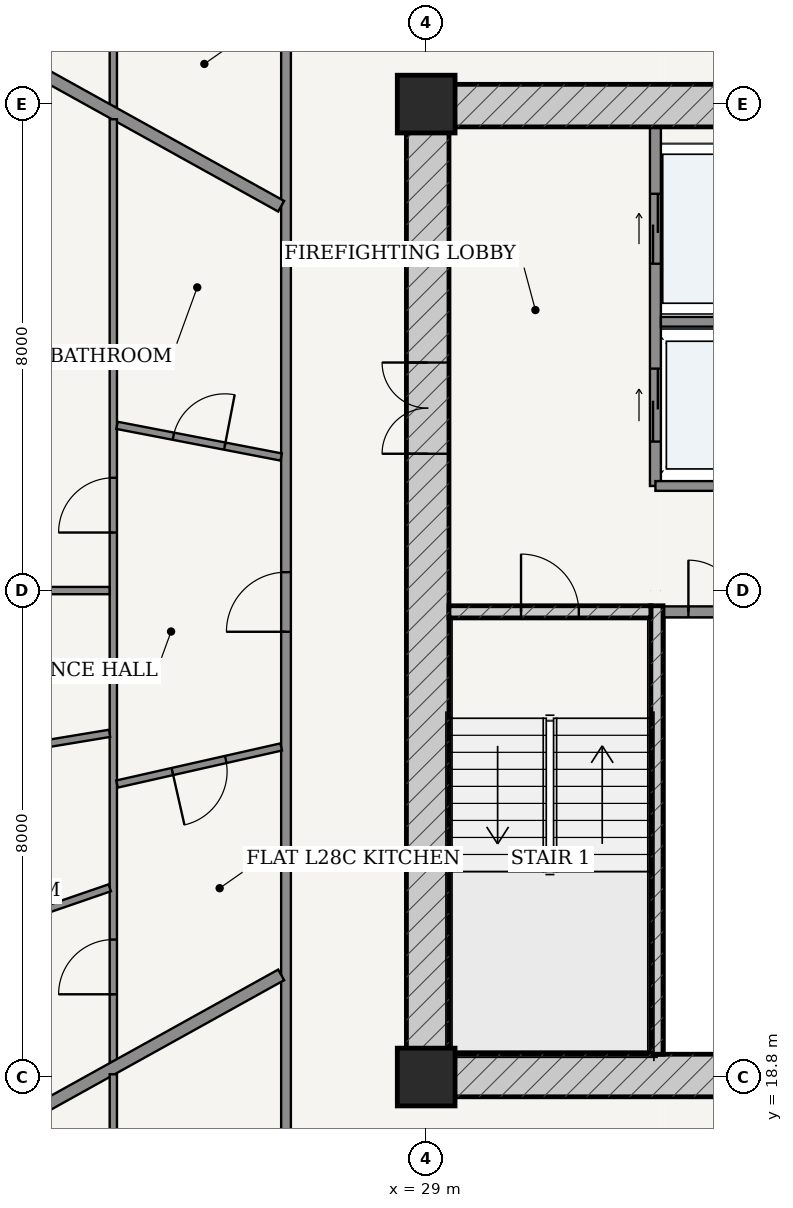
"""IFC4 building model, lengths in metres.
Left out: names, types, materials, properties, quantities, classifications, styles, units other than length and angle.
Written with IfcOpenShell. Run it as: python <this file> out.ifc"""

import sys

from ifc_helpers import new_model, si_unit, direction, frame, frame_2d, origin, origin_2d, place, context, subcontext, project, spatial, rectangle, extrude, source, transform, mapped, element, fill, save


model = new_model("IFC4")
c1 = context("Model", 3, precision=1e-05, world=origin(), true_north=direction((-0.2419218956, 0.970295726276)))
c2 = subcontext(c1, "Body", "Model", "MODEL_VIEW")
j1 = project(units=[si_unit("LENGTHUNIT", "METRE"), si_unit("PLANEANGLEUNIT", "RADIAN")], contexts=[c1])
p1 = place(None, origin())
s1 = spatial("IfcSite", under=j1, at=p1, CompositionType="ELEMENT")
p2 = place(p1, origin())
s2 = spatial("IfcBuilding", under=s1, at=p2, CompositionType="ELEMENT")
p3 = place(p2, frame((0.0, 0.0, 108.6)))
s3 = spatial("IfcBuildingStorey", under=s2, at=p3, CompositionType="ELEMENT", Elevation=108.6)
for number, where, z_axis, x_axis in (
    (1, (29.0, 18.8, 0.0), (0.0, 0.0, 1.0), (1.0, 0.0, 0.0)),
    (2, (29.0, 34.8, 0.0), (0.0, 0.0, 1.0), (1.0, 0.0, 0.0)),
):
    element("IfcColumn", number, at=place(p3, frame(where, z_axis=z_axis, x_axis=x_axis)), inside=s3, PredefinedType="COLUMN", context=c2, shape_type="SweptSolid", body=[
        extrude(rectangle(XDim=0.95, YDim=0.95, at=origin_2d()), origin(), (0.0, 0.0, 1.0), 3.6),
    ])
p4 = place(p3, frame((28.675, 18.825, 0.0), z_axis=(0.0, 0.0, 1.0), x_axis=(1.0, 0.0, 0.0)))
e3 = element("IfcWall", 3, at=p4, inside=s3, PredefinedType="SHEAR", context=c2, shape_type="SweptSolid", body=[
    extrude(rectangle(XDim=18.65, YDim=0.7, at=frame_2d((9.325, 0.0))), origin(), (0.0, 0.0, 1.0), 3.325),
])
p5 = place(p4, frame((6.877, 0.0, 0.0)))
e4 = element("IfcOpeningElement", 4, at=p5, cuts=e3, PredefinedType="OPENING", context=c2, shape_type="SweptSolid", body=[
    extrude(rectangle(XDim=0.85, YDim=2.1, at=frame_2d((0.425, 1.05))), frame((0.0, 0.36, 0.0), z_axis=(0.0, -1.0, 0.0), x_axis=(1.0, 0.0, 0.0)), (0.0, 0.0, 1.0), 0.72),
])
p6 = place(p4, frame((8.9, 0.0, 0.0)))
e5 = element("IfcOpeningElement", 5, at=p6, cuts=e3, PredefinedType="OPENING", context=c2, shape_type="SweptSolid", body=[
    extrude(rectangle(XDim=0.85, YDim=2.1, at=frame_2d((0.425, 1.05))), frame((0.0, 0.36, 0.0), z_axis=(0.0, -1.0, 0.0), x_axis=(1.0, 0.0, 0.0)), (0.0, 0.0, 1.0), 0.72),
])
p7 = place(p4, frame((10.923, 0.0, 0.0)))
e6 = element("IfcOpeningElement", 6, at=p7, cuts=e3, PredefinedType="OPENING", context=c2, shape_type="SweptSolid", body=[
    extrude(rectangle(XDim=0.85, YDim=2.1, at=frame_2d((0.425, 1.05))), frame((0.0, 0.36, 0.0), z_axis=(0.0, -1.0, 0.0), x_axis=(1.0, 0.0, 0.0)), (0.0, 0.0, 1.0), 0.72),
])
p8 = place(p3, frame((28.675, 34.775, 0.0), z_axis=(0.0, 0.0, 1.0), x_axis=(1.0, 0.0, 0.0)))
e7 = element("IfcWall", 7, at=p8, inside=s3, PredefinedType="SHEAR", context=c2, shape_type="SweptSolid", body=[
    extrude(rectangle(XDim=18.65, YDim=0.7, at=frame_2d((9.325, 0.0))), origin(), (0.0, 0.0, 1.0), 3.325),
])
p9 = place(p8, frame((7.357, 0.0, 0.0)))
e8 = element("IfcOpeningElement", 8, at=p9, cuts=e7, PredefinedType="OPENING", context=c2, shape_type="SweptSolid", body=[
    extrude(rectangle(XDim=0.86, YDim=2.1, at=frame_2d((0.43, 1.05))), frame((0.0, 0.36, 0.0), z_axis=(0.0, -1.0, 0.0), x_axis=(1.0, 0.0, 0.0)), (0.0, 0.0, 1.0), 0.72),
])
p10 = place(p8, frame((10.438, 0.0, 0.0)))
e9 = element("IfcOpeningElement", 9, at=p10, cuts=e7, PredefinedType="OPENING", context=c2, shape_type="SweptSolid", body=[
    extrude(rectangle(XDim=0.85, YDim=2.1, at=frame_2d((0.425, 1.05))), frame((0.0, 0.36, 0.0), z_axis=(0.0, -1.0, 0.0), x_axis=(1.0, 0.0, 0.0)), (0.0, 0.0, 1.0), 0.72),
])
p11 = place(p3, frame((29.025, 19.175, 0.0), z_axis=(0.0, 0.0, 1.0), x_axis=(0.0, 1.0, 0.0)))
e10 = element("IfcWall", 10, at=p11, inside=s3, PredefinedType="SHEAR", context=c2, shape_type="SweptSolid", body=[
    extrude(rectangle(XDim=15.25, YDim=0.7, at=frame_2d((7.625, 0.0))), origin(), (0.0, 0.0, 1.0), 3.325),
])
p12 = place(p11, frame((9.875, 0.0, 0.0)))
e11 = element("IfcOpeningElement", 11, at=p12, cuts=e10, PredefinedType="OPENING", context=c2, shape_type="SweptSolid", body=[
    extrude(rectangle(XDim=1.5, YDim=2.2, at=frame_2d((0.75, 1.1))), frame((0.0, 0.36, 0.0), z_axis=(0.0, -1.0, 0.0), x_axis=(1.0, 0.0, 0.0)), (0.0, 0.0, 1.0), 0.72),
])
p13 = place(p3, frame((32.795, 19.175, 0.0), z_axis=(0.0, 0.0, 1.0), x_axis=(0.0, 1.0, 0.0)))
e12 = element("IfcWall", 12, at=p13, inside=s3, PredefinedType="SOLIDWALL", context=c2, shape_type="SweptSolid", body=[
    extrude(rectangle(XDim=7.375, YDim=0.2, at=frame_2d((3.688, 0.0))), origin(), (0.0, 0.0, 1.0), 3.325),
])
p14 = place(p3, frame((29.375, 26.45, 0.0), z_axis=(0.0, 0.0, 1.0), x_axis=(1.0, 0.0, 0.0)))
e13 = element("IfcWall", 13, at=p14, inside=s3, PredefinedType="SOLIDWALL", context=c2, shape_type="SweptSolid", body=[
    extrude(rectangle(XDim=3.32, YDim=0.2, at=frame_2d((1.66, 0.0))), origin(), (0.0, 0.0, 1.0), 3.325),
])
p15 = place(p14, frame((1.185, 0.0, 0.0)))
e14 = element("IfcOpeningElement", 14, at=p15, cuts=e13, PredefinedType="OPENING", context=c2, shape_type="SweptSolid", body=[
    extrude(rectangle(XDim=0.95, YDim=2.15, at=frame_2d((0.475, 1.075))), frame((0.0, 0.11, 0.0), z_axis=(0.0, -1.0, 0.0), x_axis=(1.0, 0.0, 0.0)), (0.0, 0.0, 1.0), 0.22),
])
p16 = place(p3, frame((32.9, 26.45, 0.0), z_axis=(0.0, 0.0, 1.0), x_axis=(1.0, 0.0, 0.0)))
e15 = element("IfcWall", 15, at=p16, inside=s3, PredefinedType="PARTITIONING", context=c2, shape_type="SweptSolid", body=[
    extrude(rectangle(XDim=1.675, YDim=0.18, at=frame_2d((0.837, 0.0))), origin(), (0.0, 0.0, 1.0), 3.325),
])
p17 = place(p16, frame((0.413, 0.0, 0.0)))
e16 = element("IfcOpeningElement", 16, at=p17, cuts=e15, PredefinedType="OPENING", context=c2, shape_type="SweptSolid", body=[
    extrude(rectangle(XDim=0.85, YDim=2.1, at=frame_2d((0.425, 1.05))), frame((0.0, 0.1, 0.0), z_axis=(0.0, -1.0, 0.0), x_axis=(1.0, 0.0, 0.0)), (0.0, 0.0, 1.0), 0.2),
])
p18 = place(p3, frame((32.77, 28.52, 0.0), z_axis=(0.0, 0.0, 1.0), x_axis=(0.0, 1.0, 0.0)))
e17 = element("IfcWall", 17, at=p18, inside=s3, PredefinedType="PARTITIONING", context=c2, shape_type="SweptSolid", body=[
    extrude(rectangle(XDim=5.905, YDim=0.18, at=frame_2d((2.953, 0.0))), origin(), (0.0, 0.0, 1.0), 3.325),
])
p19 = place(p18, frame((3.655, 0.0, 0.0)))
e18 = element("IfcOpeningElement", 18, at=p19, cuts=e17, PredefinedType="OPENING", context=c2, shape_type="SweptSolid", body=[
    extrude(rectangle(XDim=1.15, YDim=2.2, at=frame_2d((0.575, 1.1))), frame((0.0, 0.1, 0.0), z_axis=(0.0, -1.0, 0.0), x_axis=(1.0, 0.0, 0.0)), (0.0, 0.0, 1.0), 0.2),
])
p20 = place(p18, frame((0.73, 0.0, 0.0)))
e19 = element("IfcOpeningElement", 19, at=p20, cuts=e17, PredefinedType="OPENING", context=c2, shape_type="SweptSolid", body=[
    extrude(rectangle(XDim=1.2, YDim=2.25, at=frame_2d((0.6, 1.125))), frame((0.0, 0.1, 0.0), z_axis=(0.0, -1.0, 0.0), x_axis=(1.0, 0.0, 0.0)), (0.0, 0.0, 1.0), 0.2),
])
p21 = place(p3, frame((32.86, 31.22, 0.0), z_axis=(0.0, 0.0, 1.0), x_axis=(1.0, 0.0, 0.0)))
e20 = element("IfcWall", 20, at=p21, inside=s3, PredefinedType="PARTITIONING", context=c2, shape_type="SweptSolid", body=[
    extrude(rectangle(XDim=1.715, YDim=0.16, at=frame_2d((0.857, 0.0))), origin(), (0.0, 0.0, 1.0), 3.325),
])
p22 = place(p3, frame((32.77, 28.52, 0.0), z_axis=(0.0, 0.0, 1.0), x_axis=(1.0, 0.0, 0.0)))
e21 = element("IfcWall", 21, at=p22, inside=s3, PredefinedType="PARTITIONING", context=c2, shape_type="SweptSolid", body=[
    extrude(rectangle(XDim=1.805, YDim=0.16, at=frame_2d((0.902, 0.0))), origin(), (0.0, 0.0, 1.0), 3.325),
])
p23 = place(p3, frame((26.695, 16.575, 0.0), z_axis=(0.0, 0.0, 1.0), x_axis=(0.0, 1.0, 0.0)))
e22 = element("IfcWall", 22, at=p23, inside=s3, PredefinedType="PARTITIONING", context=c2, shape_type="SweptSolid", body=[
    extrude(rectangle(XDim=20.45, YDim=0.16, at=frame_2d((10.225, 0.0))), origin(), (0.0, 0.0, 1.0), 2.767),
])
p24 = place(p23, frame((9.547, 0.0, 0.0)))
e23 = element("IfcOpeningElement", 23, at=p24, cuts=e22, PredefinedType="OPENING", context=c2, shape_type="SweptSolid", body=[
    extrude(rectangle(XDim=0.98, YDim=2.2, at=frame_2d((0.49, 1.1))), frame((0.0, 0.09, 0.0), z_axis=(0.0, -1.0, 0.0), x_axis=(1.0, 0.0, 0.0)), (0.0, 0.0, 1.0), 0.18),
])
p25 = place(p3, frame((23.855, 34.754, 0.0), z_axis=(0.0, 0.0, 1.0), x_axis=(0.0, 1.0, 0.0)))
e24 = element("IfcWall", 24, at=p25, inside=s3, PredefinedType="PARTITIONING", context=c2, shape_type="SweptSolid", body=[
    extrude(rectangle(XDim=5.191, YDim=0.12, at=frame_2d((2.595, 0.0))), origin(), (0.0, 0.0, 1.0), 3.004),
])
p26 = place(p25, frame((2.145, 0.0, 0.0)))
e25 = element("IfcOpeningElement", 25, at=p26, cuts=e24, PredefinedType="OPENING", context=c2, shape_type="SweptSolid", body=[
    extrude(rectangle(XDim=0.9, YDim=2.15, at=frame_2d((0.45, 1.075))), frame((0.0, 0.07, 0.0), z_axis=(0.0, -1.0, 0.0), x_axis=(1.0, 0.0, 0.0)), (0.0, 0.0, 1.0), 0.14),
])
p27 = place(p3, frame((26.615, 33.12, 0.0), z_axis=(0.0, 0.0, 1.0), x_axis=(-0.874319192772, 0.485351366692, 0.0)))
e26 = element("IfcWall", 26, at=p27, inside=s3, PredefinedType="PARTITIONING", context=c2, shape_type="SweptSolid", body=[
    extrude(rectangle(XDim=12.158, YDim=0.2, at=frame_2d((6.079, 0.0))), origin(), (0.0, 0.0, 1.0), 2.767),
])
p28 = place(p3, frame((23.855, 19.05, 0.0), z_axis=(0.0, 0.0, 1.0), x_axis=(0.0, 1.0, 0.0)))
e27 = element("IfcWall", 27, at=p28, inside=s3, PredefinedType="PARTITIONING", context=c2, shape_type="SweptSolid", body=[
    extrude(rectangle(XDim=15.501, YDim=0.12, at=frame_2d((7.75, 0.0))), origin(), (0.0, 0.0, 1.0), 2.767),
])
p29 = place(p28, frame((8.705, 0.0, 0.0)))
e28 = element("IfcOpeningElement", 28, at=p29, cuts=e27, PredefinedType="OPENING", context=c2, shape_type="SweptSolid", body=[
    extrude(rectangle(XDim=0.9, YDim=2.15, at=frame_2d((0.45, 1.075))), frame((0.0, 0.07, 0.0), z_axis=(0.0, -1.0, 0.0), x_axis=(1.0, 0.0, 0.0)), (0.0, 0.0, 1.0), 0.14),
])
p30 = place(p28, frame((1.111, 0.0, 0.0)))
e29 = element("IfcOpeningElement", 29, at=p30, cuts=e27, PredefinedType="OPENING", context=c2, shape_type="SweptSolid", body=[
    extrude(rectangle(XDim=0.9, YDim=2.15, at=frame_2d((0.45, 1.075))), frame((0.0, 0.07, 0.0), z_axis=(0.0, -1.0, 0.0), x_axis=(1.0, 0.0, 0.0)), (0.0, 0.0, 1.0), 0.14),
])
p31 = place(p3, frame((23.793, 26.8, 0.0), z_axis=(0.0, 0.0, 1.0), x_axis=(-1.0, 0.0, 0.0)))
e30 = element("IfcWall", 30, at=p31, inside=s3, PredefinedType="PARTITIONING", context=c2, shape_type="SweptSolid", body=[
    extrude(rectangle(XDim=12.333, YDim=0.12, at=frame_2d((6.167, 0.0))), origin(), (0.0, 0.0, 1.0), 2.767),
])
p32 = place(p31, frame((5.717, 0.0, 0.0)))
e31 = element("IfcOpeningElement", 31, at=p32, cuts=e30, PredefinedType="OPENING", context=c2, shape_type="SweptSolid", body=[
    extrude(rectangle(XDim=0.9, YDim=2.15, at=frame_2d((0.45, 1.075))), frame((0.0, 0.07, 0.0), z_axis=(0.0, -1.0, 0.0), x_axis=(1.0, 0.0, 0.0)), (0.0, 0.0, 1.0), 0.14),
])
p33 = place(p3, frame((23.794, 24.452, 0.0), z_axis=(0.0, 0.0, 1.0), x_axis=(-0.986620350945, -0.163034607068, 0.0)))
e32 = element("IfcWall", 32, at=p33, inside=s3, PredefinedType="PARTITIONING", context=c2, shape_type="SweptSolid", body=[
    extrude(rectangle(XDim=11.927, YDim=0.12, at=frame_2d((5.964, 0.0))), origin(), (0.0, 0.0, 1.0), 2.767),
])
p34 = place(p3, frame((23.796, 21.912, 0.0), z_axis=(0.0, 0.0, 1.0), x_axis=(-0.945574063861, -0.325406960209, 0.0)))
e33 = element("IfcWall", 33, at=p34, inside=s3, PredefinedType="PARTITIONING", context=c2, shape_type="SweptSolid", body=[
    extrude(rectangle(XDim=10.906, YDim=0.12, at=frame_2d((5.453, 0.0))), origin(), (0.0, 0.0, 1.0), 2.767),
])
p35 = place(p34, frame((5.003, 0.0, 0.0)))
e34 = element("IfcOpeningElement", 34, at=p35, cuts=e33, PredefinedType="OPENING", context=c2, shape_type="SweptSolid", body=[
    extrude(rectangle(XDim=0.9, YDim=2.15, at=frame_2d((0.45, 1.075))), frame((0.0, 0.07, 0.0), z_axis=(0.0, -1.0, 0.0), x_axis=(1.0, 0.0, 0.0)), (0.0, 0.0, 1.0), 0.14),
])
p36 = place(p3, frame((26.615, 28.996, 0.0), z_axis=(0.0, 0.0, 1.0), x_axis=(-0.98189351628, 0.18943368942, 0.0)))
e35 = element("IfcWall", 35, at=p36, inside=s3, PredefinedType="PARTITIONING", context=c2, shape_type="SweptSolid", body=[
    extrude(rectangle(XDim=2.749, YDim=0.12, at=frame_2d((1.375, 0.0))), origin(), (0.0, 0.0, 1.0), 3.325),
])
p37 = place(p36, frame((0.944, 0.0, 0.0)))
e36 = element("IfcOpeningElement", 36, at=p37, cuts=e35, PredefinedType="OPENING", context=c2, shape_type="SweptSolid", body=[
    extrude(rectangle(XDim=0.86, YDim=2.15, at=frame_2d((0.43, 1.075))), frame((0.0, 0.07, 0.0), z_axis=(0.0, -1.0, 0.0), x_axis=(1.0, 0.0, 0.0)), (0.0, 0.0, 1.0), 0.14),
])
p38 = place(p3, frame((26.615, 24.228, 0.0), z_axis=(0.0, 0.0, 1.0), x_axis=(-0.975417151515, -0.220366468706, 0.0)))
e37 = element("IfcWall", 37, at=p38, inside=s3, PredefinedType="PARTITIONING", context=c2, shape_type="SweptSolid", body=[
    extrude(rectangle(XDim=2.768, YDim=0.12, at=frame_2d((1.384, 0.0))), origin(), (0.0, 0.0, 1.0), 3.325),
])
p39 = place(p38, frame((0.934, 0.0, 0.0)))
e38 = element("IfcOpeningElement", 38, at=p39, cuts=e37, PredefinedType="OPENING", context=c2, shape_type="SweptSolid", body=[
    extrude(rectangle(XDim=0.9, YDim=2.15, at=frame_2d((0.45, 1.075))), frame((0.0, 0.07, 0.0), z_axis=(0.0, -1.0, 0.0), x_axis=(1.0, 0.0, 0.0)), (0.0, 0.0, 1.0), 0.14),
])
p40 = place(p3, frame((26.615, 20.48, 0.0), z_axis=(0.0, 0.0, 1.0), x_axis=(-0.874310671773, -0.48536671623, 0.0)))
e39 = element("IfcWall", 39, at=p40, inside=s3, PredefinedType="PARTITIONING", context=c2, shape_type="SweptSolid", body=[
    extrude(rectangle(XDim=12.159, YDim=0.2, at=frame_2d((6.079, 0.0))), origin(), (0.0, 0.0, 1.0), 2.767),
])
p41 = place(p3, frame((23.855, 13.655, 0.0), z_axis=(0.0, 0.0, 1.0), x_axis=(0.0, 1.0, 0.0)))
e40 = element("IfcWall", 40, at=p41, inside=s3, PredefinedType="PARTITIONING", context=c2, shape_type="SweptSolid", body=[
    extrude(rectangle(XDim=5.19, YDim=0.12, at=frame_2d((2.595, 0.0))), origin(), (0.0, 0.0, 1.0), 3.004),
])
m1 = source(origin(), c2, "Body", "SweptSolid", [
    extrude(rectangle(XDim=1.5, YDim=2.2, at=frame_2d((0.75, 1.1))), frame((0.0, 0.025, 0.0), z_axis=(0.0, -1.0, 0.0), x_axis=(1.0, 0.0, 0.0)), (0.0, 0.0, 1.0), 0.05),
])
p42 = place(p12, origin())
e41 = element("IfcDoor", 41, at=p42, inside=s3, OperationType="DOUBLE_DOOR_SINGLE_SWING", PredefinedType="DOOR", context=c2, shape_type="MappedRepresentation", body=[
    mapped(m1, transform((0.0, 0.0, 0.0), scale=1.0)),
])
fill(e11, e41)
m2 = source(origin(), c2, "Body", "SweptSolid", [
    extrude(rectangle(XDim=0.95, YDim=2.15, at=frame_2d((0.475, 1.075))), frame((0.0, 0.025, 0.0), z_axis=(0.0, -1.0, 0.0), x_axis=(1.0, 0.0, 0.0)), (0.0, 0.0, 1.0), 0.05),
])
p43 = place(p15, origin())
e42 = element("IfcDoor", 42, at=p43, inside=s3, OperationType="SINGLE_SWING_LEFT", PredefinedType="DOOR", context=c2, shape_type="MappedRepresentation", body=[
    mapped(m2, transform((0.0, 0.0, 0.0), scale=1.0)),
])
fill(e14, e42)
m3 = source(origin(), c2, "Body", "SweptSolid", [
    extrude(rectangle(XDim=0.85, YDim=2.1, at=frame_2d((0.425, 1.05))), frame((0.0, 0.025, 0.0), z_axis=(0.0, -1.0, 0.0), x_axis=(1.0, 0.0, 0.0)), (0.0, 0.0, 1.0), 0.05),
])
p44 = place(p17, origin())
e43 = element("IfcDoor", 43, at=p44, inside=s3, OperationType="SINGLE_SWING_LEFT", PredefinedType="DOOR", context=c2, shape_type="MappedRepresentation", body=[
    mapped(m3, transform((0.0, 0.0, 0.0), scale=1.0)),
])
fill(e16, e43)
m4 = source(origin(), c2, "Body", "SweptSolid", [
    extrude(rectangle(XDim=1.15, YDim=2.2, at=frame_2d((0.575, 1.1))), frame((0.0, 0.025, 0.0), z_axis=(0.0, -1.0, 0.0), x_axis=(1.0, 0.0, 0.0)), (0.0, 0.0, 1.0), 0.05),
])
p45 = place(p19, origin())
e44 = element("IfcDoor", 44, at=p45, inside=s3, OperationType="DOUBLE_DOOR_SLIDING", PredefinedType="DOOR", context=c2, shape_type="MappedRepresentation", body=[
    mapped(m4, transform((0.0, 0.0, 0.0), scale=1.0)),
])
fill(e18, e44)
m5 = source(origin(), c2, "Body", "SweptSolid", [
    extrude(rectangle(XDim=1.2, YDim=2.25, at=frame_2d((0.6, 1.125))), frame((0.0, 0.025, 0.0), z_axis=(0.0, -1.0, 0.0), x_axis=(1.0, 0.0, 0.0)), (0.0, 0.0, 1.0), 0.05),
])
p46 = place(p20, origin())
e45 = element("IfcDoor", 45, at=p46, inside=s3, OperationType="DOUBLE_DOOR_SLIDING", PredefinedType="DOOR", context=c2, shape_type="MappedRepresentation", body=[
    mapped(m5, transform((0.0, 0.0, 0.0), scale=1.0)),
])
fill(e19, e45)
m6 = source(origin(), c2, "Body", "SweptSolid", [
    extrude(rectangle(XDim=0.98, YDim=2.2, at=frame_2d((0.49, 1.1))), frame((0.0, 0.025, 0.0), z_axis=(0.0, -1.0, 0.0), x_axis=(1.0, 0.0, 0.0)), (0.0, 0.0, 1.0), 0.05),
])
p47 = place(p24, origin())
e46 = element("IfcDoor", 46, at=p47, inside=s3, OperationType="SINGLE_SWING_LEFT", PredefinedType="DOOR", context=c2, shape_type="MappedRepresentation", body=[
    mapped(m6, transform((0.0, 0.0, 0.0), scale=1.0)),
])
fill(e23, e46)
m7 = source(origin(), c2, "Body", "SweptSolid", [
    extrude(rectangle(XDim=0.86, YDim=2.15, at=frame_2d((0.43, 1.075))), frame((0.0, 0.025, 0.0), z_axis=(0.0, -1.0, 0.0), x_axis=(1.0, 0.0, 0.0)), (0.0, 0.0, 1.0), 0.05),
])
p48 = place(p37, frame((0.86, 0.0, 0.0), z_axis=(0.0, 0.0, 1.0), x_axis=(-1.0, 0.0, 0.0)))
e47 = element("IfcDoor", 47, at=p48, inside=s3, OperationType="SINGLE_SWING_RIGHT", PredefinedType="DOOR", context=c2, shape_type="MappedRepresentation", body=[
    mapped(m7, transform((0.0, 0.0, 0.0), scale=1.0)),
])
fill(e36, e47)
m8 = source(origin(), c2, "Body", "SweptSolid", [
    extrude(rectangle(XDim=0.9, YDim=2.15, at=frame_2d((0.45, 1.075))), frame((0.0, 0.025, 0.0), z_axis=(0.0, -1.0, 0.0), x_axis=(1.0, 0.0, 0.0)), (0.0, 0.0, 1.0), 0.05),
])
p49 = place(p29, origin())
e48 = element("IfcDoor", 48, at=p49, inside=s3, OperationType="SINGLE_SWING_LEFT", PredefinedType="DOOR", context=c2, shape_type="MappedRepresentation", body=[
    mapped(m8, transform((0.0, 0.0, 0.0), scale=1.0)),
])
fill(e28, e48)
p50 = place(p39, origin())
e49 = element("IfcDoor", 49, at=p50, inside=s3, OperationType="SINGLE_SWING_RIGHT", PredefinedType="DOOR", context=c2, shape_type="MappedRepresentation", body=[
    mapped(m8, transform((0.0, 0.0, 0.0), scale=1.0)),
])
fill(e38, e49)
p51 = place(p30, origin())
e50 = element("IfcDoor", 50, at=p51, inside=s3, OperationType="SINGLE_SWING_LEFT", PredefinedType="DOOR", context=c2, shape_type="MappedRepresentation", body=[
    mapped(m8, transform((0.0, 0.0, 0.0), scale=1.0)),
])
fill(e29, e50)
save(model, sys.argv[1])
